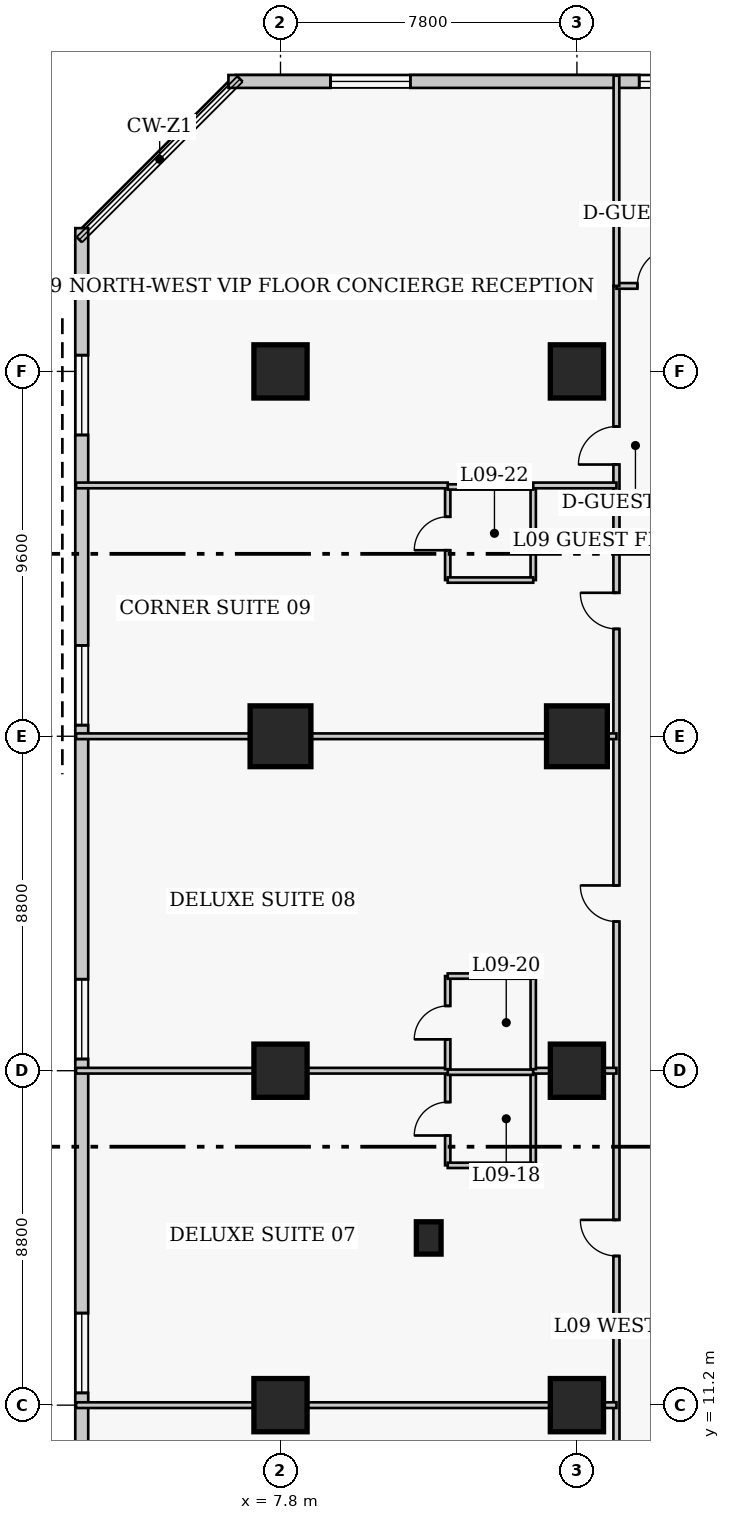
"""IFC4 building model, lengths in metres.
Left out: names, types, materials, properties, quantities, classifications, styles, units other than length and angle.
Written with IfcOpenShell. Run it as: python <this file> out.ifc"""

import sys

from ifc_helpers import new_model, si_unit, direction, frame, frame_2d, origin, origin_2d, place, context, subcontext, project, spatial, rectangle, extrude, element, fill, save


model = new_model("IFC4")
c1 = context("Model", 3, precision=1e-05, world=origin(), true_north=direction((0.0, 1.0)))
c2 = subcontext(c1, "Body", "Model", "MODEL_VIEW")
j1 = project(units=[si_unit("LENGTHUNIT", "METRE"), si_unit("PLANEANGLEUNIT", "RADIAN")], contexts=[c1])
p1 = place(None, origin())
s1 = spatial("IfcSite", under=j1, at=p1, CompositionType="ELEMENT")
p2 = place(p1, origin())
s2 = spatial("IfcBuilding", under=s1, at=p2, CompositionType="ELEMENT")
p3 = place(p2, frame((0.0, 0.0, 41.2)))
s3 = spatial("IfcBuildingStorey", under=s2, at=p3, CompositionType="ELEMENT", Elevation=41.2)
for number, where, z_axis, x_axis in (
    (1, (7.8, 11.2, 0.0), (0.0, 0.0, 1.0), (1.0, 0.0, 0.0)),
    (2, (7.8, 20.0, 0.0), (0.0, 0.0, 1.0), (1.0, 0.0, 0.0)),
):
    element("IfcColumn", number, at=place(p3, frame(where, z_axis=z_axis, x_axis=x_axis)), inside=s3, PredefinedType="COLUMN", context=c2, shape_type="SweptSolid", body=[
        extrude(rectangle(XDim=1.4, YDim=1.4, at=origin_2d()), origin(), (0.0, 0.0, 1.0), 3.8),
    ])
p4 = place(p3, frame((7.8, 28.8, 0.0), z_axis=(0.0, 0.0, 1.0), x_axis=(1.0, 0.0, 0.0)))
e3 = element("IfcColumn", 3, at=p4, inside=s3, PredefinedType="COLUMN", context=c2, shape_type="SweptSolid", body=[
    extrude(rectangle(XDim=1.6, YDim=1.6, at=origin_2d()), origin(), (0.0, 0.0, 1.0), 3.8),
])
for number, where, z_axis, x_axis in (
    (4, (7.8, 38.4, 0.0), (0.0, 0.0, 1.0), (1.0, 0.0, 0.0)),
    (5, (15.6, 11.2, 0.0), (0.0, 0.0, 1.0), (1.0, 0.0, 0.0)),
    (6, (15.6, 20.0, 0.0), (0.0, 0.0, 1.0), (1.0, 0.0, 0.0)),
):
    element("IfcColumn", number, at=place(p3, frame(where, z_axis=z_axis, x_axis=x_axis)), inside=s3, PredefinedType="COLUMN", context=c2, shape_type="SweptSolid", body=[
        extrude(rectangle(XDim=1.4, YDim=1.4, at=origin_2d()), origin(), (0.0, 0.0, 1.0), 3.8),
    ])
p5 = place(p3, frame((15.6, 28.8, 0.0), z_axis=(0.0, 0.0, 1.0), x_axis=(1.0, 0.0, 0.0)))
e7 = element("IfcColumn", 7, at=p5, inside=s3, PredefinedType="COLUMN", context=c2, shape_type="SweptSolid", body=[
    extrude(rectangle(XDim=1.6, YDim=1.6, at=origin_2d()), origin(), (0.0, 0.0, 1.0), 3.8),
])
p6 = place(p3, frame((15.6, 38.4, 0.0), z_axis=(0.0, 0.0, 1.0), x_axis=(1.0, 0.0, 0.0)))
e8 = element("IfcColumn", 8, at=p6, inside=s3, PredefinedType="COLUMN", context=c2, shape_type="SweptSolid", body=[
    extrude(rectangle(XDim=1.4, YDim=1.4, at=origin_2d()), origin(), (0.0, 0.0, 1.0), 3.8),
])
p7 = place(p3, frame((11.7, 15.6, 0.0), z_axis=(0.0, 0.0, 1.0), x_axis=(1.0, 0.0, 0.0)))
e9 = element("IfcColumn", 9, at=p7, inside=s3, PredefinedType="PILASTER", context=c2, shape_type="SweptSolid", body=[
    extrude(rectangle(XDim=0.65, YDim=0.85, at=origin_2d()), origin(), (0.0, 0.0, 1.0), 3.8),
])
p8 = place(p3, frame((36.32, 46.03, 0.0), z_axis=(0.0, 0.0, 1.0), x_axis=(-1.0, 0.0, 0.0)))
e10 = element("IfcWall", 10, at=p8, inside=s3, PredefinedType="SOLIDWALL", context=c2, shape_type="SweptSolid", body=[
    extrude(rectangle(XDim=29.89, YDim=0.34, at=frame_2d((14.945, 0.0))), origin(), (0.0, 0.0, 1.0), 3.54),
])
p9 = place(p8, frame((2.686, 0.0, 0.85)))
e11 = element("IfcOpeningElement", 11, at=p9, cuts=e10, PredefinedType="OPENING", context=c2, shape_type="SweptSolid", body=[
    extrude(rectangle(XDim=2.1, YDim=1.85, at=frame_2d((1.05, 0.925))), frame((0.0, 0.18, 0.0), z_axis=(0.0, -1.0, 0.0), x_axis=(1.0, 0.0, 0.0)), (0.0, 0.0, 1.0), 0.36),
])
p10 = place(p8, frame((10.159, 0.0, 0.85)))
e12 = element("IfcOpeningElement", 12, at=p10, cuts=e10, PredefinedType="OPENING", context=c2, shape_type="SweptSolid", body=[
    extrude(rectangle(XDim=2.1, YDim=1.85, at=frame_2d((1.05, 0.925))), frame((0.0, 0.18, 0.0), z_axis=(0.0, -1.0, 0.0), x_axis=(1.0, 0.0, 0.0)), (0.0, 0.0, 1.0), 0.36),
])
p11 = place(p8, frame((16.981, 0.0, 0.85)))
e13 = element("IfcOpeningElement", 13, at=p11, cuts=e10, PredefinedType="OPENING", context=c2, shape_type="SweptSolid", body=[
    extrude(rectangle(XDim=2.1, YDim=1.85, at=frame_2d((1.05, 0.925))), frame((0.0, 0.18, 0.0), z_axis=(0.0, -1.0, 0.0), x_axis=(1.0, 0.0, 0.0)), (0.0, 0.0, 1.0), 0.36),
])
p12 = place(p8, frame((25.104, 0.0, 0.85)))
e14 = element("IfcOpeningElement", 14, at=p12, cuts=e10, PredefinedType="OPENING", context=c2, shape_type="SweptSolid", body=[
    extrude(rectangle(XDim=2.1, YDim=1.85, at=frame_2d((1.05, 0.925))), frame((0.0, 0.18, 0.0), z_axis=(0.0, -1.0, 0.0), x_axis=(1.0, 0.0, 0.0)), (0.0, 0.0, 1.0), 0.36),
])
p13 = place(p3, frame((2.57, 42.17, 0.0), z_axis=(0.0, 0.0, 1.0), x_axis=(0.0, -1.0, 0.0)))
e15 = element("IfcWall", 15, at=p13, inside=s3, PredefinedType="SOLIDWALL", context=c2, shape_type="SweptSolid", body=[
    extrude(rectangle(XDim=35.14, YDim=0.34, at=frame_2d((17.57, 0.0))), origin(), (0.0, 0.0, 1.0), 3.54),
])
p14 = place(p13, frame((3.343, 0.0, 0.85)))
e16 = element("IfcOpeningElement", 16, at=p14, cuts=e15, PredefinedType="OPENING", context=c2, shape_type="SweptSolid", body=[
    extrude(rectangle(XDim=2.1, YDim=1.85, at=frame_2d((1.05, 0.925))), frame((0.0, 0.18, 0.0), z_axis=(0.0, -1.0, 0.0), x_axis=(1.0, 0.0, 0.0)), (0.0, 0.0, 1.0), 0.36),
])
p15 = place(p13, frame((10.978, 0.0, 0.85)))
e17 = element("IfcOpeningElement", 17, at=p15, cuts=e15, PredefinedType="OPENING", context=c2, shape_type="SweptSolid", body=[
    extrude(rectangle(XDim=2.1, YDim=1.85, at=frame_2d((1.05, 0.925))), frame((0.0, 0.18, 0.0), z_axis=(0.0, -1.0, 0.0), x_axis=(1.0, 0.0, 0.0)), (0.0, 0.0, 1.0), 0.36),
])
p16 = place(p13, frame((19.762, 0.0, 0.85)))
e18 = element("IfcOpeningElement", 18, at=p16, cuts=e15, PredefinedType="OPENING", context=c2, shape_type="SweptSolid", body=[
    extrude(rectangle(XDim=2.1, YDim=1.85, at=frame_2d((1.05, 0.925))), frame((0.0, 0.18, 0.0), z_axis=(0.0, -1.0, 0.0), x_axis=(1.0, 0.0, 0.0)), (0.0, 0.0, 1.0), 0.36),
])
p17 = place(p13, frame((28.548, 0.0, 0.85)))
e19 = element("IfcOpeningElement", 19, at=p17, cuts=e15, PredefinedType="OPENING", context=c2, shape_type="SweptSolid", body=[
    extrude(rectangle(XDim=2.1, YDim=1.85, at=frame_2d((1.05, 0.925))), frame((0.0, 0.18, 0.0), z_axis=(0.0, -1.0, 0.0), x_axis=(1.0, 0.0, 0.0)), (0.0, 0.0, 1.0), 0.36),
])
p18 = place(p3, frame((16.64, 5.05, 0.0), z_axis=(0.0, 0.0, 1.0), x_axis=(0.0, 1.0, 0.0)))
e20 = element("IfcWall", 20, at=p18, inside=s3, PredefinedType="PARTITIONING", context=c2, shape_type="SweptSolid", body=[
    extrude(rectangle(XDim=35.6, YDim=0.16, at=frame_2d((17.8, 0.0))), origin(), (0.0, 0.0, 1.0), 3.54),
])
p19 = place(p18, frame((2.6, 0.0, 0.0)))
e21 = element("IfcOpeningElement", 21, at=p19, cuts=e20, PredefinedType="OPENING", context=c2, shape_type="SweptSolid", body=[
    extrude(rectangle(XDim=0.95, YDim=2.1, at=frame_2d((0.475, 1.05))), frame((0.0, 0.09, 0.0), z_axis=(0.0, -1.0, 0.0), x_axis=(1.0, 0.0, 0.0)), (0.0, 0.0, 1.0), 0.18),
])
p20 = place(p18, frame((10.075, 0.0, 0.0)))
e22 = element("IfcOpeningElement", 22, at=p20, cuts=e20, PredefinedType="OPENING", context=c2, shape_type="SweptSolid", body=[
    extrude(rectangle(XDim=0.95, YDim=2.1, at=frame_2d((0.475, 1.05))), frame((0.0, 0.09, 0.0), z_axis=(0.0, -1.0, 0.0), x_axis=(1.0, 0.0, 0.0)), (0.0, 0.0, 1.0), 0.18),
])
p21 = place(p18, frame((18.875, 0.0, 0.0)))
e23 = element("IfcOpeningElement", 23, at=p21, cuts=e20, PredefinedType="OPENING", context=c2, shape_type="SweptSolid", body=[
    extrude(rectangle(XDim=0.95, YDim=2.1, at=frame_2d((0.475, 1.05))), frame((0.0, 0.09, 0.0), z_axis=(0.0, -1.0, 0.0), x_axis=(1.0, 0.0, 0.0)), (0.0, 0.0, 1.0), 0.18),
])
p22 = place(p18, frame((26.575, 0.0, 0.0)))
e24 = element("IfcOpeningElement", 24, at=p22, cuts=e20, PredefinedType="OPENING", context=c2, shape_type="SweptSolid", body=[
    extrude(rectangle(XDim=0.95, YDim=2.1, at=frame_2d((0.475, 1.05))), frame((0.0, 0.09, 0.0), z_axis=(0.0, -1.0, 0.0), x_axis=(1.0, 0.0, 0.0)), (0.0, 0.0, 1.0), 0.18),
])
p23 = place(p18, frame((30.9, 0.0, 0.0)))
e25 = element("IfcOpeningElement", 25, at=p23, cuts=e20, PredefinedType="OPENING", context=c2, shape_type="SweptSolid", body=[
    extrude(rectangle(XDim=1.0, YDim=2.15, at=frame_2d((0.5, 1.075))), frame((0.0, 0.09, 0.0), z_axis=(0.0, -1.0, 0.0), x_axis=(1.0, 0.0, 0.0)), (0.0, 0.0, 1.0), 0.18),
])
p24 = place(p3, frame((16.64, 40.65, 0.0), z_axis=(0.0, 0.0, 1.0), x_axis=(1.0, 0.0, 0.0)))
e26 = element("IfcWall", 26, at=p24, inside=s3, PredefinedType="PARTITIONING", context=c2, shape_type="SweptSolid", body=[
    extrude(rectangle(XDim=5.46, YDim=0.15, at=frame_2d((2.73, 0.0))), origin(), (0.0, 0.0, 1.0), 3.54),
])
p25 = place(p24, frame((0.55, 0.0, 0.0)))
e27 = element("IfcOpeningElement", 27, at=p25, cuts=e26, PredefinedType="OPENING", context=c2, shape_type="SweptSolid", body=[
    extrude(rectangle(XDim=1.0, YDim=2.15, at=frame_2d((0.5, 1.075))), frame((0.0, 0.085, 0.0), z_axis=(0.0, -1.0, 0.0), x_axis=(1.0, 0.0, 0.0)), (0.0, 0.0, 1.0), 0.17),
])
p26 = place(p3, frame((16.64, 40.65, 0.0), z_axis=(0.0, 0.0, 1.0), x_axis=(0.0, 1.0, 0.0)))
e28 = element("IfcWall", 28, at=p26, inside=s3, PredefinedType="PARTITIONING", context=c2, shape_type="SweptSolid", body=[
    extrude(rectangle(XDim=5.53, YDim=0.15, at=frame_2d((2.765, 0.0))), origin(), (0.0, 0.0, 1.0), 3.54),
])
p27 = place(p3, frame((2.42, 11.2, 0.0), z_axis=(0.0, 0.0, 1.0), x_axis=(1.0, 0.0, 0.0)))
e29 = element("IfcWall", 29, at=p27, inside=s3, PredefinedType="PARTITIONING", context=c2, shape_type="SweptSolid", body=[
    extrude(rectangle(XDim=14.22, YDim=0.15, at=frame_2d((7.11, 0.0))), origin(), (0.0, 0.0, 1.0), 2.593),
])
p28 = place(p3, frame((12.2, 17.51, 0.0), z_axis=(0.0, 0.0, 1.0), x_axis=(0.0, 1.0, 0.0)))
e30 = element("IfcWall", 30, at=p28, inside=s3, PredefinedType="PLUMBINGWALL", context=c2, shape_type="SweptSolid", body=[
    extrude(rectangle(XDim=2.45, YDim=0.14, at=frame_2d((1.225, 0.0))), origin(), (0.0, 0.0, 1.0), 3.54),
])
p29 = place(p28, frame((0.785, 0.0, 0.0)))
e31 = element("IfcOpeningElement", 31, at=p29, cuts=e30, PredefinedType="OPENING", context=c2, shape_type="SweptSolid", body=[
    extrude(rectangle(XDim=0.88, YDim=2.05, at=frame_2d((0.44, 1.025))), frame((0.0, 0.08, 0.0), z_axis=(0.0, -1.0, 0.0), x_axis=(1.0, 0.0, 0.0)), (0.0, 0.0, 1.0), 0.16),
])
p30 = place(p3, frame((14.45, 17.51, 0.0), z_axis=(0.0, 0.0, 1.0), x_axis=(0.0, 1.0, 0.0)))
e32 = element("IfcWall", 32, at=p30, inside=s3, PredefinedType="PLUMBINGWALL", context=c2, shape_type="SweptSolid", body=[
    extrude(rectangle(XDim=2.45, YDim=0.14, at=frame_2d((1.225, 0.0))), origin(), (0.0, 0.0, 1.0), 3.54),
])
p31 = place(p3, frame((12.2, 17.51, 0.0), z_axis=(0.0, 0.0, 1.0), x_axis=(1.0, 0.0, 0.0)))
e33 = element("IfcWall", 33, at=p31, inside=s3, PredefinedType="PLUMBINGWALL", context=c2, shape_type="SweptSolid", body=[
    extrude(rectangle(XDim=2.25, YDim=0.14, at=frame_2d((1.125, 0.0))), origin(), (0.0, 0.0, 1.0), 3.54),
])
p32 = place(p3, frame((12.2, 19.96, 0.0), z_axis=(0.0, 0.0, 1.0), x_axis=(1.0, 0.0, 0.0)))
e34 = element("IfcWall", 34, at=p32, inside=s3, PredefinedType="PLUMBINGWALL", context=c2, shape_type="SweptSolid", body=[
    extrude(rectangle(XDim=2.25, YDim=0.14, at=frame_2d((1.125, 0.0))), origin(), (0.0, 0.0, 1.0), 2.593),
])
p33 = place(p3, frame((2.42, 20.0, 0.0), z_axis=(0.0, 0.0, 1.0), x_axis=(1.0, 0.0, 0.0)))
e35 = element("IfcWall", 35, at=p33, inside=s3, PredefinedType="PARTITIONING", context=c2, shape_type="SweptSolid", body=[
    extrude(rectangle(XDim=9.78, YDim=0.15, at=frame_2d((4.89, 0.0))), origin(), (0.0, 0.0, 1.0), 2.593),
])
p34 = place(p3, frame((14.45, 20.0, 0.0), z_axis=(0.0, 0.0, 1.0), x_axis=(1.0, 0.0, 0.0)))
e36 = element("IfcWall", 36, at=p34, inside=s3, PredefinedType="PARTITIONING", context=c2, shape_type="SweptSolid", body=[
    extrude(rectangle(XDim=2.19, YDim=0.15, at=frame_2d((1.095, 0.0))), origin(), (0.0, 0.0, 1.0), 2.593),
])
p35 = place(p3, frame((12.2, 20.04, 0.0), z_axis=(0.0, 0.0, 1.0), x_axis=(0.0, 1.0, 0.0)))
e37 = element("IfcWall", 37, at=p35, inside=s3, PredefinedType="PLUMBINGWALL", context=c2, shape_type="SweptSolid", body=[
    extrude(rectangle(XDim=2.45, YDim=0.14, at=frame_2d((1.225, 0.0))), origin(), (0.0, 0.0, 1.0), 3.54),
])
p36 = place(p35, frame((0.785, 0.0, 0.0)))
e38 = element("IfcOpeningElement", 38, at=p36, cuts=e37, PredefinedType="OPENING", context=c2, shape_type="SweptSolid", body=[
    extrude(rectangle(XDim=0.88, YDim=2.05, at=frame_2d((0.44, 1.025))), frame((0.0, 0.08, 0.0), z_axis=(0.0, -1.0, 0.0), x_axis=(1.0, 0.0, 0.0)), (0.0, 0.0, 1.0), 0.16),
])
p37 = place(p3, frame((14.45, 20.04, 0.0), z_axis=(0.0, 0.0, 1.0), x_axis=(0.0, 1.0, 0.0)))
e39 = element("IfcWall", 39, at=p37, inside=s3, PredefinedType="PLUMBINGWALL", context=c2, shape_type="SweptSolid", body=[
    extrude(rectangle(XDim=2.45, YDim=0.14, at=frame_2d((1.225, 0.0))), origin(), (0.0, 0.0, 1.0), 3.54),
])
p38 = place(p3, frame((12.2, 22.49, 0.0), z_axis=(0.0, 0.0, 1.0), x_axis=(1.0, 0.0, 0.0)))
e40 = element("IfcWall", 40, at=p38, inside=s3, PredefinedType="PLUMBINGWALL", context=c2, shape_type="SweptSolid", body=[
    extrude(rectangle(XDim=2.25, YDim=0.14, at=frame_2d((1.125, 0.0))), origin(), (0.0, 0.0, 1.0), 3.54),
])
p39 = place(p3, frame((2.42, 28.8, 0.0), z_axis=(0.0, 0.0, 1.0), x_axis=(1.0, 0.0, 0.0)))
e41 = element("IfcWall", 41, at=p39, inside=s3, PredefinedType="PARTITIONING", context=c2, shape_type="SweptSolid", body=[
    extrude(rectangle(XDim=14.22, YDim=0.15, at=frame_2d((7.11, 0.0))), origin(), (0.0, 0.0, 1.0), 2.593),
])
p40 = place(p3, frame((12.2, 32.91, 0.0), z_axis=(0.0, 0.0, 1.0), x_axis=(0.0, 1.0, 0.0)))
e42 = element("IfcWall", 42, at=p40, inside=s3, PredefinedType="PLUMBINGWALL", context=c2, shape_type="SweptSolid", body=[
    extrude(rectangle(XDim=2.45, YDim=0.14, at=frame_2d((1.225, 0.0))), origin(), (0.0, 0.0, 1.0), 3.54),
])
p41 = place(p40, frame((0.785, 0.0, 0.0)))
e43 = element("IfcOpeningElement", 43, at=p41, cuts=e42, PredefinedType="OPENING", context=c2, shape_type="SweptSolid", body=[
    extrude(rectangle(XDim=0.88, YDim=2.05, at=frame_2d((0.44, 1.025))), frame((0.0, 0.08, 0.0), z_axis=(0.0, -1.0, 0.0), x_axis=(1.0, 0.0, 0.0)), (0.0, 0.0, 1.0), 0.16),
])
p42 = place(p3, frame((14.45, 32.91, 0.0), z_axis=(0.0, 0.0, 1.0), x_axis=(0.0, 1.0, 0.0)))
e44 = element("IfcWall", 44, at=p42, inside=s3, PredefinedType="PLUMBINGWALL", context=c2, shape_type="SweptSolid", body=[
    extrude(rectangle(XDim=2.45, YDim=0.14, at=frame_2d((1.225, 0.0))), origin(), (0.0, 0.0, 1.0), 3.54),
])
for number, where, z_axis, x_axis in (
    (45, (12.2, 32.91, 0.0), (0.0, 0.0, 1.0), (1.0, 0.0, 0.0)),
    (46, (12.2, 35.36, 0.0), (0.0, 0.0, 1.0), (1.0, 0.0, 0.0)),
):
    element("IfcWall", number, at=place(p3, frame(where, z_axis=z_axis, x_axis=x_axis)), inside=s3, PredefinedType="PLUMBINGWALL", context=c2, shape_type="SweptSolid", body=[
        extrude(rectangle(XDim=2.25, YDim=0.14, at=frame_2d((1.125, 0.0))), origin(), (0.0, 0.0, 1.0), 3.54),
    ])
p43 = place(p3, frame((2.42, 35.4, 0.0), z_axis=(0.0, 0.0, 1.0), x_axis=(1.0, 0.0, 0.0)))
e47 = element("IfcWall", 47, at=p43, inside=s3, PredefinedType="PARTITIONING", context=c2, shape_type="SweptSolid", body=[
    extrude(rectangle(XDim=9.78, YDim=0.15, at=frame_2d((4.89, 0.0))), origin(), (0.0, 0.0, 1.0), 3.54),
])
p44 = place(p3, frame((14.45, 35.4, 0.0), z_axis=(0.0, 0.0, 1.0), x_axis=(1.0, 0.0, 0.0)))
e48 = element("IfcWall", 48, at=p44, inside=s3, PredefinedType="PARTITIONING", context=c2, shape_type="SweptSolid", body=[
    extrude(rectangle(XDim=2.19, YDim=0.15, at=frame_2d((1.095, 0.0))), origin(), (0.0, 0.0, 1.0), 3.54),
])
p45 = place(p11, origin())
e49 = element("IfcWindow", 49, at=p45, inside=s3, PartitioningType="SINGLE_PANEL", PredefinedType="WINDOW", context=c2, shape_type="SweptSolid", body=[
    extrude(rectangle(XDim=2.1, YDim=1.85, at=frame_2d((1.05, 0.925))), frame((0.0, 0.03, 0.0), z_axis=(0.0, -1.0, 0.0), x_axis=(1.0, 0.0, 0.0)), (0.0, 0.0, 1.0), 0.06),
])
fill(e13, e49)
p46 = place(p12, origin())
e50 = element("IfcWindow", 50, at=p46, inside=s3, PartitioningType="SINGLE_PANEL", PredefinedType="WINDOW", context=c2, shape_type="SweptSolid", body=[
    extrude(rectangle(XDim=2.1, YDim=1.85, at=frame_2d((1.05, 0.925))), frame((0.0, 0.03, 0.0), z_axis=(0.0, -1.0, 0.0), x_axis=(1.0, 0.0, 0.0)), (0.0, 0.0, 1.0), 0.06),
])
fill(e14, e50)
p47 = place(p14, origin())
e51 = element("IfcWindow", 51, at=p47, inside=s3, PartitioningType="SINGLE_PANEL", PredefinedType="WINDOW", context=c2, shape_type="SweptSolid", body=[
    extrude(rectangle(XDim=2.1, YDim=1.85, at=frame_2d((1.05, 0.925))), frame((0.0, 0.03, 0.0), z_axis=(0.0, -1.0, 0.0), x_axis=(1.0, 0.0, 0.0)), (0.0, 0.0, 1.0), 0.06),
])
fill(e16, e51)
p48 = place(p15, origin())
e52 = element("IfcWindow", 52, at=p48, inside=s3, PartitioningType="SINGLE_PANEL", PredefinedType="WINDOW", context=c2, shape_type="SweptSolid", body=[
    extrude(rectangle(XDim=2.1, YDim=1.85, at=frame_2d((1.05, 0.925))), frame((0.0, 0.03, 0.0), z_axis=(0.0, -1.0, 0.0), x_axis=(1.0, 0.0, 0.0)), (0.0, 0.0, 1.0), 0.06),
])
fill(e17, e52)
p49 = place(p16, origin())
e53 = element("IfcWindow", 53, at=p49, inside=s3, PartitioningType="SINGLE_PANEL", PredefinedType="WINDOW", context=c2, shape_type="SweptSolid", body=[
    extrude(rectangle(XDim=2.1, YDim=1.85, at=frame_2d((1.05, 0.925))), frame((0.0, 0.03, 0.0), z_axis=(0.0, -1.0, 0.0), x_axis=(1.0, 0.0, 0.0)), (0.0, 0.0, 1.0), 0.06),
])
fill(e18, e53)
p50 = place(p17, origin())
e54 = element("IfcWindow", 54, at=p50, inside=s3, PartitioningType="SINGLE_PANEL", PredefinedType="WINDOW", context=c2, shape_type="SweptSolid", body=[
    extrude(rectangle(XDim=2.1, YDim=1.85, at=frame_2d((1.05, 0.925))), frame((0.0, 0.03, 0.0), z_axis=(0.0, -1.0, 0.0), x_axis=(1.0, 0.0, 0.0)), (0.0, 0.0, 1.0), 0.06),
])
fill(e19, e54)
p51 = place(p25, origin())
e55 = element("IfcDoor", 55, at=p51, inside=s3, OperationType="SINGLE_SWING_RIGHT", PredefinedType="DOOR", context=c2, shape_type="SweptSolid", body=[
    extrude(rectangle(XDim=1.0, YDim=2.15, at=frame_2d((0.5, 1.075))), frame((0.0, 0.025, 0.0), z_axis=(0.0, -1.0, 0.0), x_axis=(1.0, 0.0, 0.0)), (0.0, 0.0, 1.0), 0.05),
])
fill(e27, e55)
p52 = place(p29, origin())
e56 = element("IfcDoor", 56, at=p52, inside=s3, OperationType="SINGLE_SWING_LEFT", PredefinedType="DOOR", context=c2, shape_type="SweptSolid", body=[
    extrude(rectangle(XDim=0.88, YDim=2.05, at=frame_2d((0.44, 1.025))), frame((0.0, 0.025, 0.0), z_axis=(0.0, -1.0, 0.0), x_axis=(1.0, 0.0, 0.0)), (0.0, 0.0, 1.0), 0.05),
])
fill(e31, e56)
p53 = place(p20, origin())
e57 = element("IfcDoor", 57, at=p53, inside=s3, OperationType="SINGLE_SWING_RIGHT", PredefinedType="DOOR", context=c2, shape_type="SweptSolid", body=[
    extrude(rectangle(XDim=0.95, YDim=2.1, at=frame_2d((0.475, 1.05))), frame((0.0, 0.025, 0.0), z_axis=(0.0, -1.0, 0.0), x_axis=(1.0, 0.0, 0.0)), (0.0, 0.0, 1.0), 0.05),
])
fill(e22, e57)
p54 = place(p36, origin())
e58 = element("IfcDoor", 58, at=p54, inside=s3, OperationType="SINGLE_SWING_LEFT", PredefinedType="DOOR", context=c2, shape_type="SweptSolid", body=[
    extrude(rectangle(XDim=0.88, YDim=2.05, at=frame_2d((0.44, 1.025))), frame((0.0, 0.025, 0.0), z_axis=(0.0, -1.0, 0.0), x_axis=(1.0, 0.0, 0.0)), (0.0, 0.0, 1.0), 0.05),
])
fill(e38, e58)
p55 = place(p21, origin())
e59 = element("IfcDoor", 59, at=p55, inside=s3, OperationType="SINGLE_SWING_RIGHT", PredefinedType="DOOR", context=c2, shape_type="SweptSolid", body=[
    extrude(rectangle(XDim=0.95, YDim=2.1, at=frame_2d((0.475, 1.05))), frame((0.0, 0.025, 0.0), z_axis=(0.0, -1.0, 0.0), x_axis=(1.0, 0.0, 0.0)), (0.0, 0.0, 1.0), 0.05),
])
fill(e23, e59)
p56 = place(p41, origin())
e60 = element("IfcDoor", 60, at=p56, inside=s3, OperationType="SINGLE_SWING_LEFT", PredefinedType="DOOR", context=c2, shape_type="SweptSolid", body=[
    extrude(rectangle(XDim=0.88, YDim=2.05, at=frame_2d((0.44, 1.025))), frame((0.0, 0.025, 0.0), z_axis=(0.0, -1.0, 0.0), x_axis=(1.0, 0.0, 0.0)), (0.0, 0.0, 1.0), 0.05),
])
fill(e43, e60)
p57 = place(p22, origin())
e61 = element("IfcDoor", 61, at=p57, inside=s3, OperationType="SINGLE_SWING_RIGHT", PredefinedType="DOOR", context=c2, shape_type="SweptSolid", body=[
    extrude(rectangle(XDim=0.95, YDim=2.1, at=frame_2d((0.475, 1.05))), frame((0.0, 0.025, 0.0), z_axis=(0.0, -1.0, 0.0), x_axis=(1.0, 0.0, 0.0)), (0.0, 0.0, 1.0), 0.05),
])
fill(e24, e61)
p58 = place(p23, origin())
e62 = element("IfcDoor", 62, at=p58, inside=s3, OperationType="SINGLE_SWING_LEFT", PredefinedType="DOOR", context=c2, shape_type="SweptSolid", body=[
    extrude(rectangle(XDim=1.0, YDim=2.15, at=frame_2d((0.5, 1.075))), frame((0.0, 0.025, 0.0), z_axis=(0.0, -1.0, 0.0), x_axis=(1.0, 0.0, 0.0)), (0.0, 0.0, 1.0), 0.05),
])
fill(e25, e62)
save(model, sys.argv[1])
